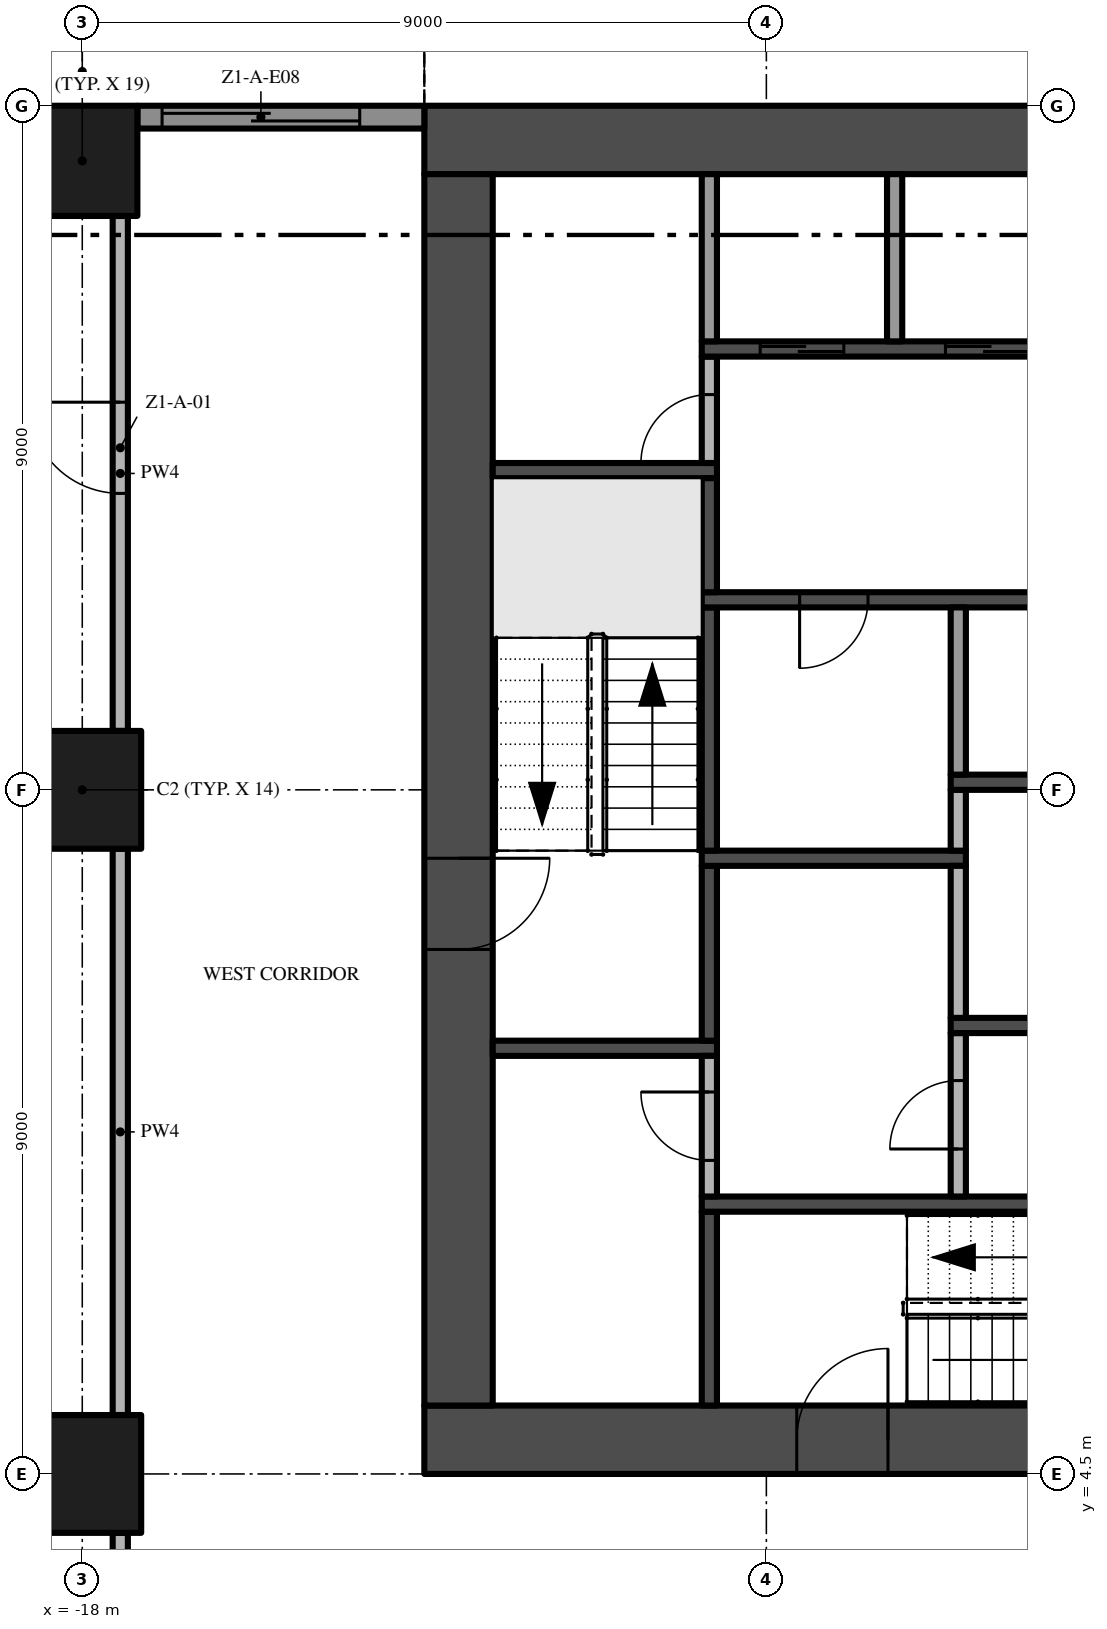
"""IFC4 building model, lengths in metres.
Left out: names, types, materials, properties, quantities, classifications, styles, units other than length and angle.
Written with IfcOpenShell. Run it as: python <this file> out.ifc"""

import sys

from ifc_helpers import new_model, si_unit, direction, frame, frame_2d, origin, origin_2d, place, context, subcontext, project, spatial, polyline, rectangle, outline, extrude, element, fill, save


model = new_model("IFC4")
c1 = context("Model", 3, precision=1e-05, world=origin(), true_north=direction((0.0, 1.0)))
c2 = subcontext(c1, "Body", "Model", "MODEL_VIEW")
j1 = project(units=[si_unit("LENGTHUNIT", "METRE"), si_unit("PLANEANGLEUNIT", "RADIAN")], contexts=[c1])
p1 = place(None, origin())
s1 = spatial("IfcSite", under=j1, at=p1, CompositionType="ELEMENT")
p2 = place(p1, origin())
s2 = spatial("IfcBuilding", under=s1, at=p2, CompositionType="ELEMENT")
p3 = place(p2, frame((0.0, 0.0, 22.6)))
s3 = spatial("IfcBuildingStorey", under=s2, at=p3, CompositionType="ELEMENT", Elevation=22.6)
p4 = place(p3, frame((-13.5, 4.95, -0.3), z_axis=(0.0, 0.0, 1.0), x_axis=(1.0, 0.0, 0.0)))
e1 = element("IfcWall", 1, at=p4, inside=s3, PredefinedType="SHEAR", context=c2, shape_type="SweptSolid", body=[
    extrude(rectangle(XDim=27.0, YDim=0.9, at=frame_2d((13.5, 0.0))), origin(), (0.0, 0.0, 1.0), 3.8),
])
p5 = place(p4, frame((12.0, 0.0, 0.3)))
e2 = element("IfcOpeningElement", 2, at=p5, cuts=e1, PredefinedType="OPENING", context=c2, shape_type="SweptSolid", body=[
    extrude(rectangle(XDim=3.0, YDim=2.4, at=frame_2d((1.5, 1.2))), frame((0.0, 0.46, 0.0), z_axis=(0.0, -1.0, 0.0), x_axis=(1.0, 0.0, 0.0)), (0.0, 0.0, 1.0), 0.92),
])
p6 = place(p4, frame((4.9, 0.0, 0.3)))
e3 = element("IfcOpeningElement", 3, at=p6, cuts=e1, PredefinedType="OPENING", context=c2, shape_type="SweptSolid", body=[
    extrude(rectangle(XDim=1.2, YDim=2.2, at=frame_2d((0.6, 1.1))), frame((0.0, 0.46, 0.0), z_axis=(0.0, -1.0, 0.0), x_axis=(1.0, 0.0, 0.0)), (0.0, 0.0, 1.0), 0.92),
])
p7 = place(p4, frame((20.75, 0.0, 0.3)))
e4 = element("IfcOpeningElement", 4, at=p7, cuts=e1, PredefinedType="OPENING", context=c2, shape_type="SweptSolid", body=[
    extrude(rectangle(XDim=1.5, YDim=2.2, at=frame_2d((0.75, 1.1))), frame((0.0, 0.46, 0.0), z_axis=(0.0, -1.0, 0.0), x_axis=(1.0, 0.0, 0.0)), (0.0, 0.0, 1.0), 0.92),
])
p8 = place(p4, frame((17.4, 0.0, 0.3)))
e5 = element("IfcOpeningElement", 5, at=p8, cuts=e1, PredefinedType="OPENING", context=c2, shape_type="SweptSolid", body=[
    extrude(rectangle(XDim=1.2, YDim=2.2, at=frame_2d((0.6, 1.1))), frame((0.0, 0.46, 0.0), z_axis=(0.0, -1.0, 0.0), x_axis=(1.0, 0.0, 0.0)), (0.0, 0.0, 1.0), 0.92),
])
p9 = place(p3, frame((13.5, 22.05, -0.3), z_axis=(0.0, 0.0, 1.0), x_axis=(-1.0, 0.0, 0.0)))
e6 = element("IfcWall", 6, at=p9, inside=s3, PredefinedType="SHEAR", context=c2, shape_type="SweptSolid", body=[
    extrude(rectangle(XDim=27.0, YDim=0.9, at=frame_2d((13.5, 0.0))), origin(), (0.0, 0.0, 1.0), 3.8),
])
p10 = place(p3, frame((-13.05, 21.6, -0.3), z_axis=(0.0, 0.0, 1.0), x_axis=(0.0, -1.0, 0.0)))
e7 = element("IfcWall", 7, at=p10, inside=s3, PredefinedType="SHEAR", context=c2, shape_type="SweptSolid", body=[
    extrude(rectangle(XDim=16.2, YDim=0.9, at=frame_2d((8.1, 0.0))), origin(), (0.0, 0.0, 1.0), 3.8),
])
p11 = place(p10, frame((9.0, 0.0, 0.3)))
e8 = element("IfcOpeningElement", 8, at=p11, cuts=e7, PredefinedType="OPENING", context=c2, shape_type="SweptSolid", body=[
    extrude(rectangle(XDim=1.2, YDim=2.2, at=frame_2d((0.6, 1.1))), frame((0.0, 0.46, 0.0), z_axis=(0.0, -1.0, 0.0), x_axis=(1.0, 0.0, 0.0)), (0.0, 0.0, 1.0), 0.92),
])
p12 = place(p3, frame((-18.0, 13.5, 0.0), z_axis=(0.0, 0.0, 1.0), x_axis=(1.0, 0.0, 0.0)))
e9 = element("IfcColumn", 9, at=p12, inside=s3, PredefinedType="COLUMN", context=c2, shape_type="SweptSolid", body=[
    extrude(rectangle(XDim=1.55, YDim=1.55, at=origin_2d()), origin(), (0.0, 0.0, 1.0), 3.5),
])
p13 = place(p3, frame((-18.0, 21.775, 0.0), z_axis=(0.0, 0.0, 1.0), x_axis=(1.0, 0.0, 0.0)))
e10 = element("IfcColumn", 10, at=p13, inside=s3, PredefinedType="COLUMN", context=c2, shape_type="SweptSolid", body=[
    extrude(rectangle(XDim=1.45, YDim=1.45, at=origin_2d()), origin(), (0.0, 0.0, 1.0), 3.5),
])
p14 = place(p3, frame((-18.0, 4.5, 0.0), z_axis=(0.0, 0.0, 1.0), x_axis=(1.0, 0.0, 0.0)))
e11 = element("IfcColumn", 11, at=p14, inside=s3, PredefinedType="COLUMN", context=c2, shape_type="SweptSolid", body=[
    extrude(rectangle(XDim=1.55, YDim=1.55, at=origin_2d()), origin(), (0.0, 0.0, 1.0), 3.5),
])
p15 = place(p3, frame((-17.275, 22.35, 0.0), z_axis=(0.0, 0.0, 1.0), x_axis=(1.0, 0.0, 0.0)))
e12 = element("IfcWall", 12, at=p15, inside=s3, PredefinedType="SOLIDWALL", context=c2, shape_type="SweptSolid", body=[
    extrude(rectangle(XDim=3.775, YDim=0.3, at=frame_2d((1.887, 0.0))), origin(), (0.0, 0.0, 1.0), 3.5),
])
p16 = place(p15, frame((0.325, 0.0, 0.0)))
e13 = element("IfcOpeningElement", 13, at=p16, cuts=e12, PredefinedType="OPENING", context=c2, shape_type="SweptSolid", body=[
    extrude(rectangle(XDim=2.6, YDim=2.4, at=frame_2d((1.3, 1.2))), frame((0.0, 0.16, 0.0), z_axis=(0.0, -1.0, 0.0), x_axis=(1.0, 0.0, 0.0)), (0.0, 0.0, 1.0), 0.32),
])
p17 = place(p3, origin())
e14 = element("IfcWall", 14, at=p17, inside=s3, PredefinedType="USERDEFINED", context=c2, shape_type="SweptSolid", body=[
    extrude(outline(polyline([(-13.5, 25.5), (-15.0, 25.271), (-16.5, 24.671), (-18.0, 23.929), (-19.5, 23.329), (-21.0, 23.1), (-22.5, 23.329), (-22.538, 23.082), (-21.0, 22.847), (-19.434, 23.086), (-17.898, 23.701), (-16.398, 24.442), (-14.934, 25.028), (-13.462, 25.253), (-13.5, 25.5)])), origin(), (0.0, 0.0, 1.0), 0.9),
])
for number, where, z_axis, x_axis in (
    (15, (-12.6, 10.1, 0.0), (0.0, 0.0, 1.0), (1.0, 0.0, 0.0)),
    (16, (-12.6, 17.7, 0.0), (0.0, 0.0, 1.0), (1.0, 0.0, 0.0)),
):
    element("IfcWall", number, at=place(p3, frame(where, z_axis=z_axis, x_axis=x_axis)), inside=s3, PredefinedType="SHEAR", context=c2, shape_type="SweptSolid", body=[
        extrude(rectangle(XDim=2.95, YDim=0.2, at=frame_2d((1.475, 0.0))), origin(), (0.0, 0.0, 1.0), 3.5),
    ])
p18 = place(p3, frame((-9.75, 5.4, 0.0), z_axis=(0.0, 0.0, 1.0), x_axis=(0.0, 1.0, 0.0)))
e17 = element("IfcWall", 17, at=p18, inside=s3, PredefinedType="SHEAR", context=c2, shape_type="SweptSolid", body=[
    extrude(rectangle(XDim=2.55, YDim=0.2, at=frame_2d((1.275, 0.0))), origin(), (0.0, 0.0, 1.0), 3.5),
])
p19 = place(p3, frame((-9.85, 8.05, 0.0), z_axis=(0.0, 0.0, 1.0), x_axis=(1.0, 0.0, 0.0)))
e18 = element("IfcWall", 18, at=p19, inside=s3, PredefinedType="SHEAR", context=c2, shape_type="SweptSolid", body=[
    extrude(rectangle(XDim=8.35, YDim=0.2, at=frame_2d((4.175, 0.0))), origin(), (0.0, 0.0, 1.0), 3.5),
])
p20 = place(p3, frame((-9.75, 8.15, 0.0), z_axis=(0.0, 0.0, 1.0), x_axis=(0.0, 1.0, 0.0)))
e19 = element("IfcWall", 19, at=p20, inside=s3, PredefinedType="PARTITIONING", context=c2, shape_type="SweptSolid", body=[
    extrude(rectangle(XDim=1.85, YDim=0.2, at=frame_2d((0.925, 0.0))), origin(), (0.0, 0.0, 1.0), 3.5),
])
p21 = place(p20, frame((0.475, 0.0, 0.0)))
e20 = element("IfcOpeningElement", 20, at=p21, cuts=e19, PredefinedType="OPENING", context=c2, shape_type="SweptSolid", body=[
    extrude(rectangle(XDim=0.9, YDim=2.1, at=frame_2d((0.45, 1.05))), frame((0.0, 0.11, 0.0), z_axis=(0.0, -1.0, 0.0), x_axis=(1.0, 0.0, 0.0)), (0.0, 0.0, 1.0), 0.22),
])
p22 = place(p3, frame((-9.75, 10.2, 0.0), z_axis=(0.0, 0.0, 1.0), x_axis=(0.0, 1.0, 0.0)))
e21 = element("IfcWall", 21, at=p22, inside=s3, PredefinedType="SHEAR", context=c2, shape_type="SweptSolid", body=[
    extrude(rectangle(XDim=2.3, YDim=0.2, at=frame_2d((1.15, 0.0))), origin(), (0.0, 0.0, 1.0), 3.5),
])
p23 = place(p3, frame((-9.85, 12.6, 0.0), z_axis=(0.0, 0.0, 1.0), x_axis=(1.0, 0.0, 0.0)))
e22 = element("IfcWall", 22, at=p23, inside=s3, PredefinedType="SHEAR", context=c2, shape_type="SweptSolid", body=[
    extrude(rectangle(XDim=3.475, YDim=0.2, at=frame_2d((1.738, 0.0))), origin(), (0.0, 0.0, 1.0), 3.5),
])
p24 = place(p3, frame((-9.75, 12.7, 0.0), z_axis=(0.0, 0.0, 1.0), x_axis=(0.0, 1.0, 0.0)))
e23 = element("IfcWall", 23, at=p24, inside=s3, PredefinedType="SHEAR", context=c2, shape_type="SweptSolid", body=[
    extrude(rectangle(XDim=3.2, YDim=0.2, at=frame_2d((1.6, 0.0))), origin(), (0.0, 0.0, 1.0), 3.5),
])
p25 = place(p3, frame((-1.5, 16.0, 0.0), z_axis=(0.0, 0.0, 1.0), x_axis=(-1.0, 0.0, 0.0)))
e24 = element("IfcWall", 24, at=p25, inside=s3, PredefinedType="SHEAR", context=c2, shape_type="SweptSolid", body=[
    extrude(rectangle(XDim=8.35, YDim=0.2, at=frame_2d((4.175, 0.0))), origin(), (0.0, 0.0, 1.0), 3.5),
])
p26 = place(p25, frame((6.162, 0.0, 0.0)))
e25 = element("IfcOpeningElement", 25, at=p26, cuts=e24, PredefinedType="OPENING", context=c2, shape_type="SweptSolid", body=[
    extrude(rectangle(XDim=0.9, YDim=2.1, at=frame_2d((0.45, 1.05))), frame((0.0, 0.11, 0.0), z_axis=(0.0, -1.0, 0.0), x_axis=(1.0, 0.0, 0.0)), (0.0, 0.0, 1.0), 0.22),
])
p27 = place(p3, frame((-9.75, 16.1, 0.0), z_axis=(0.0, 0.0, 1.0), x_axis=(0.0, 1.0, 0.0)))
e26 = element("IfcWall", 26, at=p27, inside=s3, PredefinedType="SHEAR", context=c2, shape_type="SweptSolid", body=[
    extrude(rectangle(XDim=1.5, YDim=0.2, at=frame_2d((0.75, 0.0))), origin(), (0.0, 0.0, 1.0), 3.5),
])
p28 = place(p3, frame((-9.75, 17.8, 0.0), z_axis=(0.0, 0.0, 1.0), x_axis=(0.0, 1.0, 0.0)))
e27 = element("IfcWall", 27, at=p28, inside=s3, PredefinedType="PARTITIONING", context=c2, shape_type="SweptSolid", body=[
    extrude(rectangle(XDim=1.4, YDim=0.2, at=frame_2d((0.7, 0.0))), origin(), (0.0, 0.0, 1.0), 3.5),
])
p29 = place(p28, origin())
e28 = element("IfcOpeningElement", 28, at=p29, cuts=e27, PredefinedType="OPENING", context=c2, shape_type="SweptSolid", body=[
    extrude(rectangle(XDim=0.9, YDim=2.1, at=frame_2d((0.45, 1.05))), frame((0.0, 0.11, 0.0), z_axis=(0.0, -1.0, 0.0), x_axis=(1.0, 0.0, 0.0)), (0.0, 0.0, 1.0), 0.22),
])
p30 = place(p3, frame((-9.85, 19.3, 0.0), z_axis=(0.0, 0.0, 1.0), x_axis=(1.0, 0.0, 0.0)))
e29 = element("IfcWall", 29, at=p30, inside=s3, PredefinedType="SHEAR", context=c2, shape_type="SweptSolid", body=[
    extrude(rectangle(XDim=19.7, YDim=0.2, at=frame_2d((9.85, 0.0))), origin(), (0.0, 0.0, 1.0), 3.5),
])
p31 = place(p30, frame((0.769, 0.0, 0.0)))
e30 = element("IfcOpeningElement", 30, at=p31, cuts=e29, PredefinedType="OPENING", context=c2, shape_type="SweptSolid", body=[
    extrude(rectangle(XDim=1.1, YDim=2.1, at=frame_2d((0.55, 1.05))), frame((0.0, 0.11, 0.0), z_axis=(0.0, -1.0, 0.0), x_axis=(1.0, 0.0, 0.0)), (0.0, 0.0, 1.0), 0.22),
])
p32 = place(p30, frame((3.206, 0.0, 0.0)))
e31 = element("IfcOpeningElement", 31, at=p32, cuts=e29, PredefinedType="OPENING", context=c2, shape_type="SweptSolid", body=[
    extrude(rectangle(XDim=1.1, YDim=2.1, at=frame_2d((0.55, 1.05))), frame((0.0, 0.11, 0.0), z_axis=(0.0, -1.0, 0.0), x_axis=(1.0, 0.0, 0.0)), (0.0, 0.0, 1.0), 0.22),
])
p33 = place(p30, frame((5.644, 0.0, 0.0)))
e32 = element("IfcOpeningElement", 32, at=p33, cuts=e29, PredefinedType="OPENING", context=c2, shape_type="SweptSolid", body=[
    extrude(rectangle(XDim=1.1, YDim=2.1, at=frame_2d((0.55, 1.05))), frame((0.0, 0.11, 0.0), z_axis=(0.0, -1.0, 0.0), x_axis=(1.0, 0.0, 0.0)), (0.0, 0.0, 1.0), 0.22),
])
p34 = place(p30, frame((8.081, 0.0, 0.0)))
e33 = element("IfcOpeningElement", 33, at=p34, cuts=e29, PredefinedType="OPENING", context=c2, shape_type="SweptSolid", body=[
    extrude(rectangle(XDim=1.1, YDim=2.1, at=frame_2d((0.55, 1.05))), frame((0.0, 0.11, 0.0), z_axis=(0.0, -1.0, 0.0), x_axis=(1.0, 0.0, 0.0)), (0.0, 0.0, 1.0), 0.22),
])
for number, where, z_axis, x_axis in (
    (34, (-9.75, 19.4, 0.0), (0.0, 0.0, 1.0), (0.0, 1.0, 0.0)),
    (35, (-7.312, 19.4, 0.0), (0.0, 0.0, 1.0), (0.0, 1.0, 0.0)),
):
    element("IfcWall", number, at=place(p3, frame(where, z_axis=z_axis, x_axis=x_axis)), inside=s3, PredefinedType="PARTITIONING", context=c2, shape_type="SweptSolid", body=[
        extrude(rectangle(XDim=2.2, YDim=0.2, at=frame_2d((1.1, 0.0))), origin(), (0.0, 0.0, 1.0), 3.5),
    ])
p35 = place(p3, frame((-6.475, 8.15, 0.0), z_axis=(0.0, 0.0, 1.0), x_axis=(0.0, 1.0, 0.0)))
e36 = element("IfcWall", 36, at=p35, inside=s3, PredefinedType="PARTITIONING", context=c2, shape_type="SweptSolid", body=[
    extrude(rectangle(XDim=2.15, YDim=0.2, at=frame_2d((1.075, 0.0))), origin(), (0.0, 0.0, 1.0), 3.5),
])
p36 = place(p35, frame((0.625, 0.0, 0.0)))
e37 = element("IfcOpeningElement", 37, at=p36, cuts=e36, PredefinedType="OPENING", context=c2, shape_type="SweptSolid", body=[
    extrude(rectangle(XDim=0.9, YDim=2.1, at=frame_2d((0.45, 1.05))), frame((0.0, 0.11, 0.0), z_axis=(0.0, -1.0, 0.0), x_axis=(1.0, 0.0, 0.0)), (0.0, 0.0, 1.0), 0.22),
])
p37 = place(p3, frame((-6.575, 10.4, 0.0), z_axis=(0.0, 0.0, 1.0), x_axis=(1.0, 0.0, 0.0)))
e38 = element("IfcWall", 38, at=p37, inside=s3, PredefinedType="SHEAR", context=c2, shape_type="SweptSolid", body=[
    extrude(rectangle(XDim=5.075, YDim=0.2, at=frame_2d((2.538, 0.0))), origin(), (0.0, 0.0, 1.0), 3.5),
])
p38 = place(p3, frame((-6.475, 10.5, 0.0), z_axis=(0.0, 0.0, 1.0), x_axis=(0.0, 1.0, 0.0)))
e39 = element("IfcWall", 39, at=p38, inside=s3, PredefinedType="PARTITIONING", context=c2, shape_type="SweptSolid", body=[
    extrude(rectangle(XDim=2.0, YDim=0.2, at=frame_2d((1.0, 0.0))), origin(), (0.0, 0.0, 1.0), 3.5),
])
p39 = place(p3, frame((-6.475, 12.7, 0.0), z_axis=(0.0, 0.0, 1.0), x_axis=(0.0, 1.0, 0.0)))
e40 = element("IfcWall", 40, at=p39, inside=s3, PredefinedType="PARTITIONING", context=c2, shape_type="SweptSolid", body=[
    extrude(rectangle(XDim=0.8, YDim=0.2, at=frame_2d((0.4, 0.0))), origin(), (0.0, 0.0, 1.0), 3.5),
])
p40 = place(p3, frame((-6.575, 13.6, 0.0), z_axis=(0.0, 0.0, 1.0), x_axis=(1.0, 0.0, 0.0)))
e41 = element("IfcWall", 41, at=p40, inside=s3, PredefinedType="SHEAR", context=c2, shape_type="SweptSolid", body=[
    extrude(rectangle(XDim=5.075, YDim=0.2, at=frame_2d((2.538, 0.0))), origin(), (0.0, 0.0, 1.0), 3.5),
])
p41 = place(p3, frame((-6.475, 13.7, 0.0), z_axis=(0.0, 0.0, 1.0), x_axis=(0.0, 1.0, 0.0)))
e42 = element("IfcWall", 42, at=p41, inside=s3, PredefinedType="PARTITIONING", context=c2, shape_type="SweptSolid", body=[
    extrude(rectangle(XDim=2.2, YDim=0.2, at=frame_2d((1.1, 0.0))), origin(), (0.0, 0.0, 1.0), 3.5),
])
p42 = place(p3, frame((-17.5, -0.2, 0.0), z_axis=(0.0, 0.0, 1.0), x_axis=(0.0, 1.0, 0.0)))
e43 = element("IfcWall", 43, at=p42, inside=s3, PredefinedType="PARTITIONING", context=c2, shape_type="SweptSolid", body=[
    extrude(rectangle(XDim=3.925, YDim=0.2, at=frame_2d((1.962, 0.0))), origin(), (0.0, 0.0, 1.0), 3.5),
])
p43 = place(p3, frame((-17.5, 5.275, 0.0), z_axis=(0.0, 0.0, 1.0), x_axis=(0.0, 1.0, 0.0)))
e44 = element("IfcWall", 44, at=p43, inside=s3, PredefinedType="PARTITIONING", context=c2, shape_type="SweptSolid", body=[
    extrude(rectangle(XDim=7.45, YDim=0.2, at=frame_2d((3.725, 0.0))), origin(), (0.0, 0.0, 1.0), 3.5),
])
p44 = place(p3, frame((-17.5, 14.275, 0.0), z_axis=(0.0, 0.0, 1.0), x_axis=(0.0, 1.0, 0.0)))
e45 = element("IfcWall", 45, at=p44, inside=s3, PredefinedType="PARTITIONING", context=c2, shape_type="SweptSolid", body=[
    extrude(rectangle(XDim=6.775, YDim=0.2, at=frame_2d((3.388, 0.0))), origin(), (0.0, 0.0, 1.0), 3.5),
])
p45 = place(p44, frame((3.125, 0.0, 0.0)))
e46 = element("IfcOpeningElement", 46, at=p45, cuts=e45, PredefinedType="OPENING", context=c2, shape_type="SweptSolid", body=[
    extrude(rectangle(XDim=1.2, YDim=2.4, at=frame_2d((0.6, 1.2))), frame((0.0, 0.11, 0.0), z_axis=(0.0, -1.0, 0.0), x_axis=(1.0, 0.0, 0.0)), (0.0, 0.0, 1.0), 0.22),
])
p46 = place(p16, origin())
e47 = element("IfcDoor", 47, at=p46, inside=s3, OperationType="SINGLE_SWING_LEFT", PredefinedType="DOOR", context=c2, shape_type="SweptSolid", body=[
    extrude(rectangle(XDim=2.6, YDim=2.4, at=frame_2d((1.3, 1.2))), frame((0.0, 0.025, 0.0), z_axis=(0.0, -1.0, 0.0), x_axis=(1.0, 0.0, 0.0)), (0.0, 0.0, 1.0), 0.05),
])
fill(e13, e47)
p47 = place(p11, frame((1.2, 0.0, 0.0), z_axis=(0.0, 0.0, 1.0), x_axis=(-1.0, 0.0, 0.0)))
e48 = element("IfcDoor", 48, at=p47, inside=s3, OperationType="SINGLE_SWING_RIGHT", PredefinedType="DOOR", context=c2, shape_type="SweptSolid", body=[
    extrude(rectangle(XDim=1.2, YDim=2.2, at=frame_2d((0.6, 1.1))), frame((0.0, 0.025, 0.0), z_axis=(0.0, -1.0, 0.0), x_axis=(1.0, 0.0, 0.0)), (0.0, 0.0, 1.0), 0.05),
])
fill(e8, e48)
p48 = place(p6, frame((1.2, 0.0, 0.0), z_axis=(0.0, 0.0, 1.0), x_axis=(-1.0, 0.0, 0.0)))
e49 = element("IfcDoor", 49, at=p48, inside=s3, OperationType="SINGLE_SWING_LEFT", PredefinedType="DOOR", context=c2, shape_type="SweptSolid", body=[
    extrude(rectangle(XDim=1.2, YDim=2.2, at=frame_2d((0.6, 1.1))), frame((0.0, 0.025, 0.0), z_axis=(0.0, -1.0, 0.0), x_axis=(1.0, 0.0, 0.0)), (0.0, 0.0, 1.0), 0.05),
])
fill(e3, e49)
p49 = place(p31, origin())
e50 = element("IfcDoor", 50, at=p49, inside=s3, OperationType="SLIDING_TO_LEFT", PredefinedType="DOOR", context=c2, shape_type="SweptSolid", body=[
    extrude(rectangle(XDim=1.1, YDim=2.1, at=frame_2d((0.55, 1.05))), frame((0.0, 0.025, 0.0), z_axis=(0.0, -1.0, 0.0), x_axis=(1.0, 0.0, 0.0)), (0.0, 0.0, 1.0), 0.05),
])
fill(e30, e50)
p50 = place(p32, origin())
e51 = element("IfcDoor", 51, at=p50, inside=s3, OperationType="SLIDING_TO_LEFT", PredefinedType="DOOR", context=c2, shape_type="SweptSolid", body=[
    extrude(rectangle(XDim=1.1, YDim=2.1, at=frame_2d((0.55, 1.05))), frame((0.0, 0.025, 0.0), z_axis=(0.0, -1.0, 0.0), x_axis=(1.0, 0.0, 0.0)), (0.0, 0.0, 1.0), 0.05),
])
fill(e31, e51)
p51 = place(p26, origin())
e52 = element("IfcDoor", 52, at=p51, inside=s3, OperationType="SINGLE_SWING_RIGHT", PredefinedType="DOOR", context=c2, shape_type="SweptSolid", body=[
    extrude(rectangle(XDim=0.9, YDim=2.1, at=frame_2d((0.45, 1.05))), frame((0.0, 0.025, 0.0), z_axis=(0.0, -1.0, 0.0), x_axis=(1.0, 0.0, 0.0)), (0.0, 0.0, 1.0), 0.05),
])
fill(e25, e52)
p52 = place(p29, origin())
e53 = element("IfcDoor", 53, at=p52, inside=s3, OperationType="SINGLE_SWING_LEFT", PredefinedType="DOOR", context=c2, shape_type="SweptSolid", body=[
    extrude(rectangle(XDim=0.9, YDim=2.1, at=frame_2d((0.45, 1.05))), frame((0.0, 0.025, 0.0), z_axis=(0.0, -1.0, 0.0), x_axis=(1.0, 0.0, 0.0)), (0.0, 0.0, 1.0), 0.05),
])
fill(e28, e53)
p53 = place(p36, origin())
e54 = element("IfcDoor", 54, at=p53, inside=s3, OperationType="SINGLE_SWING_LEFT", PredefinedType="DOOR", context=c2, shape_type="SweptSolid", body=[
    extrude(rectangle(XDim=0.9, YDim=2.1, at=frame_2d((0.45, 1.05))), frame((0.0, 0.025, 0.0), z_axis=(0.0, -1.0, 0.0), x_axis=(1.0, 0.0, 0.0)), (0.0, 0.0, 1.0), 0.05),
])
fill(e37, e54)
p54 = place(p21, origin())
e55 = element("IfcDoor", 55, at=p54, inside=s3, OperationType="SINGLE_SWING_RIGHT", PredefinedType="DOOR", context=c2, shape_type="SweptSolid", body=[
    extrude(rectangle(XDim=0.9, YDim=2.1, at=frame_2d((0.45, 1.05))), frame((0.0, 0.025, 0.0), z_axis=(0.0, -1.0, 0.0), x_axis=(1.0, 0.0, 0.0)), (0.0, 0.0, 1.0), 0.05),
])
fill(e20, e55)
p55 = place(p45, origin())
e56 = element("IfcDoor", 56, at=p55, inside=s3, OperationType="SINGLE_SWING_RIGHT", PredefinedType="DOOR", context=c2, shape_type="SweptSolid", body=[
    extrude(rectangle(XDim=1.2, YDim=2.4, at=frame_2d((0.6, 1.2))), frame((0.0, 0.025, 0.0), z_axis=(0.0, -1.0, 0.0), x_axis=(1.0, 0.0, 0.0)), (0.0, 0.0, 1.0), 0.05),
])
fill(e46, e56)
save(model, sys.argv[1])
